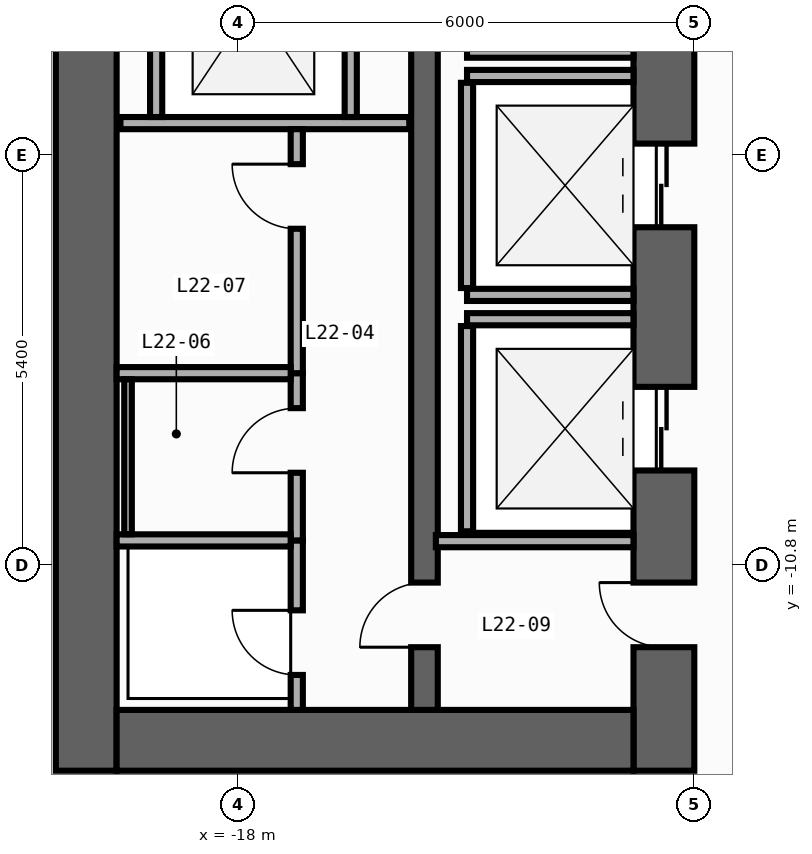
"""IFC4 building model, lengths in metres.
Left out: names, types, materials, properties, quantities, classifications, styles, units other than length and angle.
Written with IfcOpenShell. Run it as: python <this file> out.ifc"""

import sys

from ifc_helpers import new_model, si_unit, direction, frame, frame_2d, origin, place, context, subcontext, project, spatial, rectangle, extrude, element, fill, save


model = new_model("IFC4")
c1 = context("Model", 3, precision=1e-05, world=origin(), true_north=direction((0.0, 1.0)))
c2 = subcontext(c1, "Body", "Model", "MODEL_VIEW")
j1 = project(units=[si_unit("LENGTHUNIT", "METRE"), si_unit("PLANEANGLEUNIT", "RADIAN")], contexts=[c1])
p1 = place(None, origin())
s1 = spatial("IfcSite", under=j1, at=p1, CompositionType="ELEMENT")
p2 = place(p1, origin())
s2 = spatial("IfcBuilding", under=s1, at=p2, CompositionType="ELEMENT")
p3 = place(p2, frame((0.0, 0.0, 97.4)))
s3 = spatial("IfcBuildingStorey", under=s2, at=p3, CompositionType="ELEMENT", Elevation=97.4)
p4 = place(p3, frame((-20.0, -13.5, 0.0), z_axis=(0.0, 0.0, 1.0), x_axis=(0.0, 1.0, 0.0)))
e1 = element("IfcWall", 1, at=p4, inside=s3, PredefinedType="SHEAR", context=c2, shape_type="SweptSolid", body=[
    extrude(rectangle(XDim=27.0, YDim=0.8, at=frame_2d((13.5, 0.0))), origin(), (0.0, 0.0, 1.0), 3.94),
])
p5 = place(p3, frame((-12.4, -13.5, 0.0), z_axis=(0.0, 0.0, 1.0), x_axis=(0.0, 1.0, 0.0)))
e2 = element("IfcWall", 2, at=p5, inside=s3, PredefinedType="SHEAR", context=c2, shape_type="SweptSolid", body=[
    extrude(rectangle(XDim=27.0, YDim=0.8, at=frame_2d((13.5, 0.0))), origin(), (0.0, 0.0, 1.0), 3.94),
])
p6 = place(p5, frame((10.35, 0.0, 0.0)))
e3 = element("IfcOpeningElement", 3, at=p6, cuts=e2, PredefinedType="OPENING", context=c2, shape_type="SweptSolid", body=[
    extrude(rectangle(XDim=1.1, YDim=2.2, at=frame_2d((0.55, 1.1))), frame((0.0, 0.41, 0.0), z_axis=(0.0, -1.0, 0.0), x_axis=(1.0, 0.0, 0.0)), (0.0, 0.0, 1.0), 0.82),
])
p7 = place(p5, frame((7.15, 0.0, 0.0)))
e4 = element("IfcOpeningElement", 4, at=p7, cuts=e2, PredefinedType="OPENING", context=c2, shape_type="SweptSolid", body=[
    extrude(rectangle(XDim=1.1, YDim=2.2, at=frame_2d((0.55, 1.1))), frame((0.0, 0.41, 0.0), z_axis=(0.0, -1.0, 0.0), x_axis=(1.0, 0.0, 0.0)), (0.0, 0.0, 1.0), 0.82),
])
p8 = place(p5, frame((3.95, 0.0, 0.0)))
e5 = element("IfcOpeningElement", 5, at=p8, cuts=e2, PredefinedType="OPENING", context=c2, shape_type="SweptSolid", body=[
    extrude(rectangle(XDim=1.1, YDim=2.2, at=frame_2d((0.55, 1.1))), frame((0.0, 0.41, 0.0), z_axis=(0.0, -1.0, 0.0), x_axis=(1.0, 0.0, 0.0)), (0.0, 0.0, 1.0), 0.82),
])
p9 = place(p5, frame((15.175, 0.0, 0.0)))
e6 = element("IfcOpeningElement", 6, at=p9, cuts=e2, PredefinedType="OPENING", context=c2, shape_type="SweptSolid", body=[
    extrude(rectangle(XDim=0.85, YDim=2.1, at=frame_2d((0.425, 1.05))), frame((0.0, 0.41, 0.0), z_axis=(0.0, -1.0, 0.0), x_axis=(1.0, 0.0, 0.0)), (0.0, 0.0, 1.0), 0.82),
])
p10 = place(p5, frame((21.275, 0.0, 0.0)))
e7 = element("IfcOpeningElement", 7, at=p10, cuts=e2, PredefinedType="OPENING", context=c2, shape_type="SweptSolid", body=[
    extrude(rectangle(XDim=0.85, YDim=2.1, at=frame_2d((0.425, 1.05))), frame((0.0, 0.41, 0.0), z_axis=(0.0, -1.0, 0.0), x_axis=(1.0, 0.0, 0.0)), (0.0, 0.0, 1.0), 0.82),
])
p11 = place(p5, frame((12.725, 0.0, 0.0)))
e8 = element("IfcOpeningElement", 8, at=p11, cuts=e2, PredefinedType="OPENING", context=c2, shape_type="SweptSolid", body=[
    extrude(rectangle(XDim=1.15, YDim=2.2, at=frame_2d((0.575, 1.1))), frame((0.0, 0.41, 0.0), z_axis=(0.0, -1.0, 0.0), x_axis=(1.0, 0.0, 0.0)), (0.0, 0.0, 1.0), 0.82),
])
p12 = place(p5, frame((1.625, 0.0, 0.0)))
e9 = element("IfcOpeningElement", 9, at=p12, cuts=e2, PredefinedType="OPENING", context=c2, shape_type="SweptSolid", body=[
    extrude(rectangle(XDim=0.85, YDim=2.1, at=frame_2d((0.425, 1.05))), frame((0.0, 0.41, 0.0), z_axis=(0.0, -1.0, 0.0), x_axis=(1.0, 0.0, 0.0)), (0.0, 0.0, 1.0), 0.82),
])
p13 = place(p3, frame((-19.6, -13.1, 0.0), z_axis=(0.0, 0.0, 1.0), x_axis=(1.0, 0.0, 0.0)))
e10 = element("IfcWall", 10, at=p13, inside=s3, PredefinedType="SHEAR", context=c2, shape_type="SweptSolid", body=[
    extrude(rectangle(XDim=6.8, YDim=0.8, at=frame_2d((3.4, 0.0))), origin(), (0.0, 0.0, 1.0), 3.94),
])
p14 = place(p3, frame((-15.55, -12.7, 0.0), z_axis=(0.0, 0.0, 1.0), x_axis=(0.0, 1.0, 0.0)))
e11 = element("IfcWall", 11, at=p14, inside=s3, PredefinedType="SHEAR", context=c2, shape_type="SweptSolid", body=[
    extrude(rectangle(XDim=25.4, YDim=0.35, at=frame_2d((12.7, 0.0))), origin(), (0.0, 0.0, 1.0), 3.94),
])
p15 = place(p14, frame((11.925, 0.0, 0.0)))
e12 = element("IfcOpeningElement", 12, at=p15, cuts=e11, PredefinedType="OPENING", context=c2, shape_type="SweptSolid", body=[
    extrude(rectangle(XDim=1.15, YDim=2.2, at=frame_2d((0.575, 1.1))), frame((0.0, 0.185, 0.0), z_axis=(0.0, -1.0, 0.0), x_axis=(1.0, 0.0, 0.0)), (0.0, 0.0, 1.0), 0.37),
])
p16 = place(p14, frame((0.825, 0.0, 0.0)))
e13 = element("IfcOpeningElement", 13, at=p16, cuts=e11, PredefinedType="OPENING", context=c2, shape_type="SweptSolid", body=[
    extrude(rectangle(XDim=0.85, YDim=2.1, at=frame_2d((0.425, 1.05))), frame((0.0, 0.185, 0.0), z_axis=(0.0, -1.0, 0.0), x_axis=(1.0, 0.0, 0.0)), (0.0, 0.0, 1.0), 0.37),
])
for number, where, z_axis, x_axis in (
    (14, (-14.99, -4.04, 0.0), (0.0, 0.0, 1.0), (1.0, 0.0, 0.0)),
    (15, (-14.99, -7.24, 0.0), (0.0, 0.0, 1.0), (1.0, 0.0, 0.0)),
    (16, (-14.99, -4.36, 0.0), (0.0, 0.0, 1.0), (1.0, 0.0, 0.0)),
):
    element("IfcWall", number, at=place(p3, frame(where, z_axis=z_axis, x_axis=x_axis)), inside=s3, PredefinedType="STANDARD", context=c2, shape_type="SweptSolid", body=[
        extrude(rectangle(XDim=2.19, YDim=0.16, at=frame_2d((1.095, 0.0))), origin(), (0.0, 0.0, 1.0), 3.94),
    ])
p17 = place(p3, frame((-14.99, -7.15, 0.0), z_axis=(0.0, 0.0, 1.0), x_axis=(0.0, 1.0, 0.0)))
e17 = element("IfcWall", 17, at=p17, inside=s3, PredefinedType="STANDARD", context=c2, shape_type="SweptSolid", body=[
    extrude(rectangle(XDim=2.7, YDim=0.16, at=frame_2d((1.35, 0.0))), origin(), (0.0, 0.0, 1.0), 3.94),
])
p18 = place(p3, frame((-14.99, -7.56, 0.0), z_axis=(0.0, 0.0, 1.0), x_axis=(1.0, 0.0, 0.0)))
e18 = element("IfcWall", 18, at=p18, inside=s3, PredefinedType="STANDARD", context=c2, shape_type="SweptSolid", body=[
    extrude(rectangle(XDim=2.19, YDim=0.16, at=frame_2d((1.095, 0.0))), origin(), (0.0, 0.0, 1.0), 3.94),
])
p19 = place(p3, frame((-14.99, -10.35, 0.0), z_axis=(0.0, 0.0, 1.0), x_axis=(0.0, 1.0, 0.0)))
e19 = element("IfcWall", 19, at=p19, inside=s3, PredefinedType="STANDARD", context=c2, shape_type="SweptSolid", body=[
    extrude(rectangle(XDim=2.7, YDim=0.16, at=frame_2d((1.35, 0.0))), origin(), (0.0, 0.0, 1.0), 3.94),
])
p20 = place(p3, frame((-19.55, -4.98, 0.0), z_axis=(0.0, 0.0, 1.0), x_axis=(1.0, 0.0, 0.0)))
e20 = element("IfcWall", 20, at=p20, inside=s3, PredefinedType="STANDARD", context=c2, shape_type="SweptSolid", body=[
    extrude(rectangle(XDim=3.8, YDim=0.16, at=frame_2d((1.9, 0.0))), origin(), (0.0, 0.0, 1.0), 3.94),
])
for number, where, z_axis, x_axis in (
    (21, (-19.08, -4.9, 0.0), (0.0, 0.0, 1.0), (0.0, 1.0, 0.0)),
    (22, (-16.52, -4.9, 0.0), (0.0, 0.0, 1.0), (0.0, 1.0, 0.0)),
):
    element("IfcWall", number, at=place(p3, frame(where, z_axis=z_axis, x_axis=x_axis)), inside=s3, PredefinedType="STANDARD", context=c2, shape_type="SweptSolid", body=[
        extrude(rectangle(XDim=2.96, YDim=0.16, at=frame_2d((1.48, 0.0))), origin(), (0.0, 0.0, 1.0), 3.94),
    ])
p21 = place(p3, frame((-15.4, -10.48, 0.0), z_axis=(0.0, 0.0, 1.0), x_axis=(1.0, 0.0, 0.0)))
e23 = element("IfcWall", 23, at=p21, inside=s3, PredefinedType="STANDARD", context=c2, shape_type="SweptSolid", body=[
    extrude(rectangle(XDim=2.6, YDim=0.16, at=frame_2d((1.3, 0.0))), origin(), (0.0, 0.0, 1.0), 3.94),
])
p22 = place(p3, frame((-17.23, -12.7, 0.0), z_axis=(0.0, 0.0, 1.0), x_axis=(0.0, 1.0, 0.0)))
e24 = element("IfcWall", 24, at=p22, inside=s3, PredefinedType="PARTITIONING", context=c2, shape_type="SweptSolid", body=[
    extrude(rectangle(XDim=2.23, YDim=0.16, at=frame_2d((1.115, 0.0))), origin(), (0.0, 0.0, 1.0), 3.94),
])
p23 = place(p22, frame((0.46, 0.0, 0.0)))
e25 = element("IfcOpeningElement", 25, at=p23, cuts=e24, PredefinedType="OPENING", context=c2, shape_type="SweptSolid", body=[
    extrude(rectangle(XDim=0.85, YDim=2.1, at=frame_2d((0.425, 1.05))), frame((0.0, 0.09, 0.0), z_axis=(0.0, -1.0, 0.0), x_axis=(1.0, 0.0, 0.0)), (0.0, 0.0, 1.0), 0.18),
])
p24 = place(p3, frame((-17.23, -10.47, 0.0), z_axis=(0.0, 0.0, 1.0), x_axis=(0.0, 1.0, 0.0)))
e26 = element("IfcWall", 26, at=p24, inside=s3, PredefinedType="PARTITIONING", context=c2, shape_type="SweptSolid", body=[
    extrude(rectangle(XDim=2.2, YDim=0.16, at=frame_2d((1.1, 0.0))), origin(), (0.0, 0.0, 1.0), 3.94),
])
p25 = place(p24, frame((0.89, 0.0, 0.0)))
e27 = element("IfcOpeningElement", 27, at=p25, cuts=e26, PredefinedType="OPENING", context=c2, shape_type="SweptSolid", body=[
    extrude(rectangle(XDim=0.85, YDim=2.1, at=frame_2d((0.425, 1.05))), frame((0.0, 0.09, 0.0), z_axis=(0.0, -1.0, 0.0), x_axis=(1.0, 0.0, 0.0)), (0.0, 0.0, 1.0), 0.18),
])
p26 = place(p3, frame((-17.23, -8.27, 0.0), z_axis=(0.0, 0.0, 1.0), x_axis=(0.0, 1.0, 0.0)))
e28 = element("IfcWall", 28, at=p26, inside=s3, PredefinedType="PARTITIONING", context=c2, shape_type="SweptSolid", body=[
    extrude(rectangle(XDim=3.21, YDim=0.16, at=frame_2d((1.605, 0.0))), origin(), (0.0, 0.0, 1.0), 3.94),
])
p27 = place(p26, frame((1.9, 0.0, 0.0)))
e29 = element("IfcOpeningElement", 29, at=p27, cuts=e28, PredefinedType="OPENING", context=c2, shape_type="SweptSolid", body=[
    extrude(rectangle(XDim=0.85, YDim=2.1, at=frame_2d((0.425, 1.05))), frame((0.0, 0.09, 0.0), z_axis=(0.0, -1.0, 0.0), x_axis=(1.0, 0.0, 0.0)), (0.0, 0.0, 1.0), 0.18),
])
for number, where, z_axis, x_axis in (
    (30, (-19.6, -10.47, 0.0), (0.0, 0.0, 1.0), (1.0, 0.0, 0.0)),
    (31, (-19.6, -8.27, 0.0), (0.0, 0.0, 1.0), (1.0, 0.0, 0.0)),
):
    element("IfcWall", number, at=place(p3, frame(where, z_axis=z_axis, x_axis=x_axis)), inside=s3, PredefinedType="PARTITIONING", context=c2, shape_type="SweptSolid", body=[
        extrude(rectangle(XDim=2.29, YDim=0.16, at=frame_2d((1.145, 0.0))), origin(), (0.0, 0.0, 1.0), 3.94),
    ])
p28 = place(p3, frame((-19.45, -10.39, 0.0), z_axis=(0.0, 0.0, 1.0), x_axis=(0.0, 1.0, 0.0)))
e32 = element("IfcWall", 32, at=p28, inside=s3, PredefinedType="PARTITIONING", context=c2, shape_type="SweptSolid", body=[
    extrude(rectangle(XDim=2.04, YDim=0.1, at=frame_2d((1.02, 0.0))), origin(), (0.0, 0.0, 1.0), 3.94),
])
p29 = place(p7, origin())
e33 = element("IfcDoor", 33, at=p29, inside=s3, OperationType="DOUBLE_DOOR_SLIDING", PredefinedType="DOOR", context=c2, shape_type="SweptSolid", body=[
    extrude(rectangle(XDim=1.1, YDim=2.2, at=frame_2d((0.55, 1.1))), frame((0.0, 0.025, 0.0), z_axis=(0.0, -1.0, 0.0), x_axis=(1.0, 0.0, 0.0)), (0.0, 0.0, 1.0), 0.05),
])
fill(e4, e33)
p30 = place(p8, origin())
e34 = element("IfcDoor", 34, at=p30, inside=s3, OperationType="DOUBLE_DOOR_SLIDING", PredefinedType="DOOR", context=c2, shape_type="SweptSolid", body=[
    extrude(rectangle(XDim=1.1, YDim=2.2, at=frame_2d((0.55, 1.1))), frame((0.0, 0.025, 0.0), z_axis=(0.0, -1.0, 0.0), x_axis=(1.0, 0.0, 0.0)), (0.0, 0.0, 1.0), 0.05),
])
fill(e5, e34)
p31 = place(p12, origin())
e35 = element("IfcDoor", 35, at=p31, inside=s3, OperationType="SINGLE_SWING_RIGHT", PredefinedType="DOOR", context=c2, shape_type="SweptSolid", body=[
    extrude(rectangle(XDim=0.85, YDim=2.1, at=frame_2d((0.425, 1.05))), frame((0.0, 0.025, 0.0), z_axis=(0.0, -1.0, 0.0), x_axis=(1.0, 0.0, 0.0)), (0.0, 0.0, 1.0), 0.05),
])
fill(e9, e35)
p32 = place(p16, origin())
e36 = element("IfcDoor", 36, at=p32, inside=s3, OperationType="SINGLE_SWING_LEFT", PredefinedType="DOOR", context=c2, shape_type="SweptSolid", body=[
    extrude(rectangle(XDim=0.85, YDim=2.1, at=frame_2d((0.425, 1.05))), frame((0.0, 0.025, 0.0), z_axis=(0.0, -1.0, 0.0), x_axis=(1.0, 0.0, 0.0)), (0.0, 0.0, 1.0), 0.05),
])
fill(e13, e36)
p33 = place(p23, origin())
e37 = element("IfcDoor", 37, at=p33, inside=s3, OperationType="SINGLE_SWING_RIGHT", PredefinedType="DOOR", context=c2, shape_type="SweptSolid", body=[
    extrude(rectangle(XDim=0.85, YDim=2.1, at=frame_2d((0.425, 1.05))), frame((0.0, 0.025, 0.0), z_axis=(0.0, -1.0, 0.0), x_axis=(1.0, 0.0, 0.0)), (0.0, 0.0, 1.0), 0.05),
])
fill(e25, e37)
p34 = place(p25, origin())
e38 = element("IfcDoor", 38, at=p34, inside=s3, OperationType="SINGLE_SWING_LEFT", PredefinedType="DOOR", context=c2, shape_type="SweptSolid", body=[
    extrude(rectangle(XDim=0.85, YDim=2.1, at=frame_2d((0.425, 1.05))), frame((0.0, 0.025, 0.0), z_axis=(0.0, -1.0, 0.0), x_axis=(1.0, 0.0, 0.0)), (0.0, 0.0, 1.0), 0.05),
])
fill(e27, e38)
p35 = place(p27, origin())
e39 = element("IfcDoor", 39, at=p35, inside=s3, OperationType="SINGLE_SWING_RIGHT", PredefinedType="DOOR", context=c2, shape_type="SweptSolid", body=[
    extrude(rectangle(XDim=0.85, YDim=2.1, at=frame_2d((0.425, 1.05))), frame((0.0, 0.025, 0.0), z_axis=(0.0, -1.0, 0.0), x_axis=(1.0, 0.0, 0.0)), (0.0, 0.0, 1.0), 0.05),
])
fill(e29, e39)
save(model, sys.argv[1])
